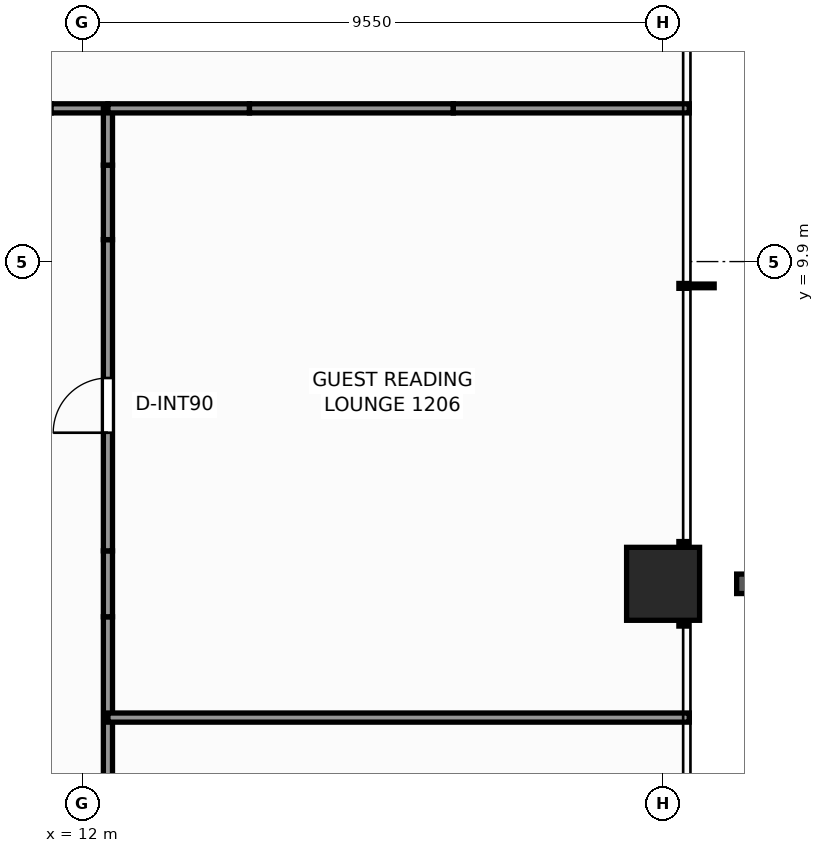
"""IFC4 building model, lengths in metres.
Left out: names, types, materials, properties, quantities, classifications, styles, units other than length and angle.
Written with IfcOpenShell. Run it as: python <this file> out.ifc"""

import sys

from ifc_helpers import new_model, si_unit, direction, frame, frame_2d, origin, origin_2d, place, context, subcontext, project, spatial, rectangle, extrude, element, fill, save


model = new_model("IFC4")
c1 = context("Model", 3, precision=1e-05, world=origin(), true_north=direction((0.0, 1.0)))
c2 = subcontext(c1, "Body", "Model", "MODEL_VIEW")
j1 = project(units=[si_unit("LENGTHUNIT", "METRE"), si_unit("PLANEANGLEUNIT", "RADIAN")], contexts=[c1])
p1 = place(None, origin())
s1 = spatial("IfcSite", under=j1, at=p1, CompositionType="ELEMENT")
p2 = place(p1, origin())
s2 = spatial("IfcBuilding", under=s1, at=p2, CompositionType="ELEMENT")
p3 = place(p2, frame((0.0, 0.0, 43.6)))
s3 = spatial("IfcBuildingStorey", under=s2, at=p3, CompositionType="ELEMENT", Elevation=43.6)
p4 = place(p3, frame((21.55, 4.6, 0.0), z_axis=(0.0, 0.0, 1.0), x_axis=(1.0, 0.0, 0.0)))
e1 = element("IfcColumn", 1, at=p4, inside=s3, PredefinedType="COLUMN", context=c2, shape_type="SweptSolid", body=[
    extrude(rectangle(XDim=1.2, YDim=1.2, at=origin_2d()), origin(), (0.0, 0.0, 1.0), 3.3),
])
p5 = place(p3, frame((11.486, 12.42, 0.0), z_axis=(0.0, 0.0, 1.0), x_axis=(1.0, 0.0, 0.0)))
e2 = element("IfcWall", 2, at=p5, inside=s3, PredefinedType="PARTITIONING", context=c2, shape_type="SweptSolid", body=[
    extrude(rectangle(XDim=0.934, YDim=0.15, at=frame_2d((0.467, 0.0))), origin(), (0.0, 0.0, 1.0), 3.06),
])
p6 = place(p3, frame((12.42, -4.058, 0.0), z_axis=(0.0, 0.0, 1.0), x_axis=(0.0, 1.0, 0.0)))
e3 = element("IfcWall", 3, at=p6, inside=s3, PredefinedType="PARTITIONING", context=c2, shape_type="SweptSolid", body=[
    extrude(rectangle(XDim=8.116, YDim=0.15, at=frame_2d((4.058, 0.0))), origin(), (0.0, 0.0, 1.0), 2.349),
])
p7 = place(p6, frame((1.578, 0.0, 0.0)))
e4 = element("IfcOpeningElement", 4, at=p7, cuts=e3, PredefinedType="OPENING", context=c2, shape_type="SweptSolid", body=[
    extrude(rectangle(XDim=0.9, YDim=2.06, at=frame_2d((0.45, 1.03))), frame((0.0, 0.085, 0.0), z_axis=(0.0, -1.0, 0.0), x_axis=(1.0, 0.0, 0.0)), (0.0, 0.0, 1.0), 0.17),
])
p8 = place(p3, frame((12.42, 4.058, 0.0), z_axis=(0.0, 0.0, 1.0), x_axis=(0.0, 1.0, 0.0)))
e5 = element("IfcWall", 5, at=p8, inside=s3, PredefinedType="PARTITIONING", context=c2, shape_type="SweptSolid", body=[
    extrude(rectangle(XDim=1.084, YDim=0.15, at=frame_2d((0.542, 0.0))), origin(), (0.0, 0.0, 1.0), 1.545),
])
p9 = place(p3, frame((12.42, 5.142, 0.0), z_axis=(0.0, 0.0, 1.0), x_axis=(0.0, 1.0, 0.0)))
e6 = element("IfcWall", 6, at=p9, inside=s3, PredefinedType="PARTITIONING", context=c2, shape_type="SweptSolid", body=[
    extrude(rectangle(XDim=5.119, YDim=0.15, at=frame_2d((2.56, 0.0))), origin(), (0.0, 0.0, 1.0), 3.06),
])
p10 = place(p9, frame((1.943, 0.0, 0.0)))
e7 = element("IfcOpeningElement", 7, at=p10, cuts=e6, PredefinedType="OPENING", context=c2, shape_type="SweptSolid", body=[
    extrude(rectangle(XDim=0.9, YDim=2.06, at=frame_2d((0.45, 1.03))), frame((0.0, 0.085, 0.0), z_axis=(0.0, -1.0, 0.0), x_axis=(1.0, 0.0, 0.0)), (0.0, 0.0, 1.0), 0.17),
])
p11 = place(p3, frame((12.42, 10.261, 0.0), z_axis=(0.0, 0.0, 1.0), x_axis=(0.0, 1.0, 0.0)))
e8 = element("IfcWall", 8, at=p11, inside=s3, PredefinedType="PARTITIONING", context=c2, shape_type="SweptSolid", body=[
    extrude(rectangle(XDim=1.225, YDim=0.15, at=frame_2d((0.612, 0.0))), origin(), (0.0, 0.0, 1.0), 1.545),
])
p12 = place(p3, frame((12.42, 11.486, 0.0), z_axis=(0.0, 0.0, 1.0), x_axis=(0.0, 1.0, 0.0)))
e9 = element("IfcWall", 9, at=p12, inside=s3, PredefinedType="PARTITIONING", context=c2, shape_type="SweptSolid", body=[
    extrude(rectangle(XDim=0.934, YDim=0.15, at=frame_2d((0.467, 0.0))), origin(), (0.0, 0.0, 1.0), 3.06),
])
p13 = place(p3, frame((12.42, 12.42, 0.0), z_axis=(0.0, 0.0, 1.0), x_axis=(1.0, 0.0, 0.0)))
e10 = element("IfcWall", 10, at=p13, inside=s3, PredefinedType="PARTITIONING", context=c2, shape_type="SweptSolid", body=[
    extrude(rectangle(XDim=2.328, YDim=0.15, at=frame_2d((1.164, 0.0))), origin(), (0.0, 0.0, 1.0), 3.06),
])
p14 = place(p3, frame((14.748, 12.42, 0.0), z_axis=(0.0, 0.0, 1.0), x_axis=(1.0, 0.0, 0.0)))
e11 = element("IfcWall", 11, at=p14, inside=s3, PredefinedType="PARTITIONING", context=c2, shape_type="SweptSolid", body=[
    extrude(rectangle(XDim=3.352, YDim=0.15, at=frame_2d((1.676, 0.0))), origin(), (0.0, 0.0, 1.0), 1.545),
])
p15 = place(p3, frame((18.1, 12.42, 0.0), z_axis=(0.0, 0.0, 1.0), x_axis=(1.0, 0.0, 0.0)))
e12 = element("IfcWall", 12, at=p15, inside=s3, PredefinedType="PARTITIONING", context=c2, shape_type="SweptSolid", body=[
    extrude(rectangle(XDim=3.88, YDim=0.15, at=frame_2d((1.94, 0.0))), origin(), (0.0, 0.0, 1.0), 2.429),
])
p16 = place(p3, frame((12.42, 2.4, 0.0), z_axis=(0.0, 0.0, 1.0), x_axis=(1.0, 0.0, 0.0)))
e13 = element("IfcWall", 13, at=p16, inside=s3, PredefinedType="PARTITIONING", context=c2, shape_type="SweptSolid", body=[
    extrude(rectangle(XDim=9.56, YDim=0.15, at=frame_2d((4.78, 0.0))), origin(), (0.0, 0.0, 1.0), 2.429),
])
p17 = place(p10, origin())
e14 = element("IfcDoor", 14, at=p17, inside=s3, OperationType="SINGLE_SWING_LEFT", PredefinedType="DOOR", context=c2, shape_type="SweptSolid", body=[
    extrude(rectangle(XDim=0.9, YDim=2.06, at=frame_2d((0.45, 1.03))), frame((0.0, 0.025, 0.0), z_axis=(0.0, -1.0, 0.0), x_axis=(1.0, 0.0, 0.0)), (0.0, 0.0, 1.0), 0.05),
])
fill(e7, e14)
save(model, sys.argv[1])
